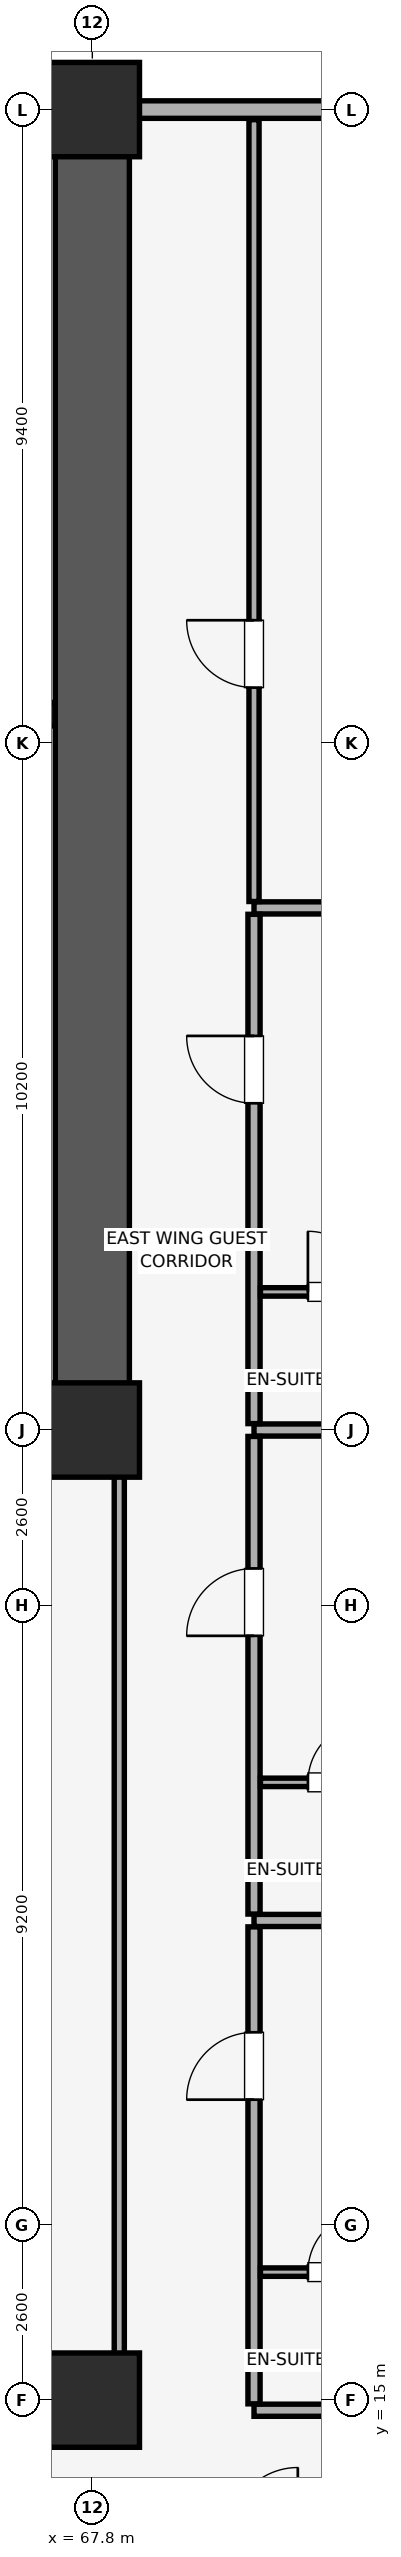
"""IFC4 building model, lengths in metres.
Left out: names, types, materials, properties, quantities, classifications, styles, units other than length and angle.
Written with IfcOpenShell. Run it as: python <this file> out.ifc"""

import sys

from ifc_helpers import new_model, si_unit, direction, frame, frame_2d, origin, origin_2d, place, context, subcontext, project, spatial, rectangle, extrude, element, fill, save


model = new_model("IFC4")
c1 = context("Model", 3, precision=1e-05, world=origin(), true_north=direction((0.0, 1.0)))
c2 = subcontext(c1, "Body", "Model", "MODEL_VIEW")
j1 = project(units=[si_unit("LENGTHUNIT", "METRE"), si_unit("PLANEANGLEUNIT", "RADIAN")], contexts=[c1])
p1 = place(None, origin())
s1 = spatial("IfcSite", under=j1, at=p1, CompositionType="ELEMENT")
p2 = place(p1, origin())
s2 = spatial("IfcBuilding", under=s1, at=p2, CompositionType="ELEMENT")
p3 = place(p2, frame((0.0, 0.0, 68.9)))
s3 = spatial("IfcBuildingStorey", under=s2, at=p3, CompositionType="ELEMENT", Elevation=68.9)
for number, where, z_axis, x_axis in (
    (1, (67.8, 15.0, 0.0), (0.0, 0.0, 1.0), (1.0, 0.0, 0.0)),
    (2, (67.8, 29.4, 0.0), (0.0, 0.0, 1.0), (1.0, 0.0, 0.0)),
    (3, (67.8, 49.0, 0.0), (0.0, 0.0, 1.0), (1.0, 0.0, 0.0)),
):
    element("IfcColumn", number, at=place(p3, frame(where, z_axis=z_axis, x_axis=x_axis)), inside=s3, PredefinedType="COLUMN", context=c2, shape_type="SweptSolid", body=[
        extrude(rectangle(XDim=1.4, YDim=1.4, at=origin_2d()), origin(), (0.0, 0.0, 1.0), 3.51),
    ])
p4 = place(p3, frame((79.8, 49.0, 0.0), z_axis=(0.0, 0.0, 1.0), x_axis=(-1.0, 0.0, 0.0)))
e4 = element("IfcWall", 4, at=p4, inside=s3, PredefinedType="SOLIDWALL", context=c2, shape_type="SweptSolid", body=[
    extrude(rectangle(XDim=75.6, YDim=0.26, at=frame_2d((37.8, 0.0))), origin(), (0.0, 0.0, 1.0), 2.56),
])
p5 = place(p4, frame((72.565, 0.0, 0.85)))
e5 = element("IfcOpeningElement", 5, at=p5, cuts=e4, PredefinedType="OPENING", context=c2, shape_type="SweptSolid", body=[
    extrude(rectangle(XDim=1.5, YDim=1.4, at=frame_2d((0.75, 0.7))), frame((0.0, 0.14, 0.0), z_axis=(0.0, -1.0, 0.0), x_axis=(1.0, 0.0, 0.0)), (0.0, 0.0, 1.0), 0.28),
])
p6 = place(p4, frame((67.45, 0.0, 0.85)))
e6 = element("IfcOpeningElement", 6, at=p6, cuts=e4, PredefinedType="OPENING", context=c2, shape_type="SweptSolid", body=[
    extrude(rectangle(XDim=1.5, YDim=1.4, at=frame_2d((0.75, 0.7))), frame((0.0, 0.14, 0.0), z_axis=(0.0, -1.0, 0.0), x_axis=(1.0, 0.0, 0.0)), (0.0, 0.0, 1.0), 0.28),
])
p7 = place(p4, frame((6.65, 0.0, 0.85)))
e7 = element("IfcOpeningElement", 7, at=p7, cuts=e4, PredefinedType="OPENING", context=c2, shape_type="SweptSolid", body=[
    extrude(rectangle(XDim=1.5, YDim=1.4, at=frame_2d((0.75, 0.7))), frame((0.0, 0.14, 0.0), z_axis=(0.0, -1.0, 0.0), x_axis=(1.0, 0.0, 0.0)), (0.0, 0.0, 1.0), 0.28),
])
p8 = place(p4, frame((1.535, 0.0, 0.85)))
e8 = element("IfcOpeningElement", 8, at=p8, cuts=e4, PredefinedType="OPENING", context=c2, shape_type="SweptSolid", body=[
    extrude(rectangle(XDim=1.5, YDim=1.4, at=frame_2d((0.75, 0.7))), frame((0.0, 0.14, 0.0), z_axis=(0.0, -1.0, 0.0), x_axis=(1.0, 0.0, 0.0)), (0.0, 0.0, 1.0), 0.28),
])
p9 = place(p4, frame((51.365, 0.0, 0.9)))
e9 = element("IfcOpeningElement", 9, at=p9, cuts=e4, PredefinedType="OPENING", context=c2, shape_type="SweptSolid", body=[
    extrude(rectangle(XDim=1.5, YDim=1.4, at=frame_2d((0.75, 0.7))), frame((0.0, 0.14, 0.0), z_axis=(0.0, -1.0, 0.0), x_axis=(1.0, 0.0, 0.0)), (0.0, 0.0, 1.0), 0.28),
])
p10 = place(p4, frame((46.0, 0.0, 0.9)))
e10 = element("IfcOpeningElement", 10, at=p10, cuts=e4, PredefinedType="OPENING", context=c2, shape_type="SweptSolid", body=[
    extrude(rectangle(XDim=1.5, YDim=1.4, at=frame_2d((0.75, 0.7))), frame((0.0, 0.14, 0.0), z_axis=(0.0, -1.0, 0.0), x_axis=(1.0, 0.0, 0.0)), (0.0, 0.0, 1.0), 0.28),
])
p11 = place(p4, frame((29.15, 0.0, 0.9)))
e11 = element("IfcOpeningElement", 11, at=p11, cuts=e4, PredefinedType="OPENING", context=c2, shape_type="SweptSolid", body=[
    extrude(rectangle(XDim=1.5, YDim=1.4, at=frame_2d((0.75, 0.7))), frame((0.0, 0.14, 0.0), z_axis=(0.0, -1.0, 0.0), x_axis=(1.0, 0.0, 0.0)), (0.0, 0.0, 1.0), 0.28),
])
p12 = place(p4, frame((23.485, 0.0, 0.9)))
e12 = element("IfcOpeningElement", 12, at=p12, cuts=e4, PredefinedType="OPENING", context=c2, shape_type="SweptSolid", body=[
    extrude(rectangle(XDim=1.5, YDim=1.4, at=frame_2d((0.75, 0.7))), frame((0.0, 0.14, 0.0), z_axis=(0.0, -1.0, 0.0), x_axis=(1.0, 0.0, 0.0)), (0.0, 0.0, 1.0), 0.28),
])
p13 = place(p3, frame((67.8, 29.4, 0.0), z_axis=(0.0, 0.0, 1.0), x_axis=(0.0, 1.0, 0.0)))
e13 = element("IfcWall", 13, at=p13, inside=s3, PredefinedType="SHEAR", context=c2, shape_type="SweptSolid", body=[
    extrude(rectangle(XDim=19.2, YDim=1.1, at=frame_2d((9.6, 0.0))), origin(), (0.0, 0.0, 1.0), 3.51),
])
p14 = place(p3, frame((60.4, 29.4, 0.0), z_axis=(0.0, 0.0, 1.0), x_axis=(1.0, 0.0, 0.0)))
e14 = element("IfcWall", 14, at=p14, inside=s3, PredefinedType="SHEAR", context=c2, shape_type="SweptSolid", body=[
    extrude(rectangle(XDim=6.845, YDim=1.1, at=frame_2d((3.423, 0.0))), origin(), (0.0, 0.0, 1.0), 3.51),
])
p15 = place(p3, frame((63.145, 40.025, 0.0), z_axis=(0.0, 0.0, 1.0), x_axis=(1.0, 0.0, 0.0)))
e15 = element("IfcWall", 15, at=p15, inside=s3, PredefinedType="SHEAR", context=c2, shape_type="SweptSolid", body=[
    extrude(rectangle(XDim=4.1, YDim=0.35, at=frame_2d((2.05, 0.0))), origin(), (0.0, 0.0, 1.0), 3.51),
])
p16 = place(p15, frame((1.24, 0.0, 0.0)))
e16 = element("IfcOpeningElement", 16, at=p16, cuts=e15, PredefinedType="OPENING", context=c2, shape_type="SweptSolid", body=[
    extrude(rectangle(XDim=1.15, YDim=2.15, at=frame_2d((0.575, 1.075))), frame((0.0, 0.185, 0.0), z_axis=(0.0, -1.0, 0.0), x_axis=(1.0, 0.0, 0.0)), (0.0, 0.0, 1.0), 0.37),
])
p17 = place(p3, frame((59.0, 14.85, 0.0), z_axis=(0.0, 0.0, 1.0), x_axis=(1.0, 0.0, 0.0)))
e17 = element("IfcWall", 17, at=p17, inside=s3, PredefinedType="PARTITIONING", context=c2, shape_type="SweptSolid", body=[
    extrude(rectangle(XDim=9.2, YDim=0.15, at=frame_2d((4.6, 0.0))), origin(), (0.0, 0.0, 1.0), 2.86),
])
p18 = place(p17, frame((4.1, 0.0, 0.0)))
e18 = element("IfcOpeningElement", 18, at=p18, cuts=e17, PredefinedType="OPENING", context=c2, shape_type="SweptSolid", body=[
    extrude(rectangle(XDim=1.0, YDim=2.15, at=frame_2d((0.5, 1.075))), frame((0.0, 0.085, 0.0), z_axis=(0.0, -1.0, 0.0), x_axis=(1.0, 0.0, 0.0)), (0.0, 0.0, 1.0), 0.17),
])
p19 = place(p3, frame((68.2, 14.93, 0.0), z_axis=(0.0, 0.0, 1.0), x_axis=(0.0, 1.0, 0.0)))
e19 = element("IfcWall", 19, at=p19, inside=s3, PredefinedType="PARTITIONING", context=c2, shape_type="SweptSolid", body=[
    extrude(rectangle(XDim=14.46, YDim=0.15, at=frame_2d((7.23, 0.0))), origin(), (0.0, 0.0, 1.0), 3.51),
])
p20 = place(p3, frame((70.2, 14.85, 0.0), z_axis=(0.0, 0.0, 1.0), x_axis=(1.0, 0.0, 0.0)))
e20 = element("IfcWall", 20, at=p20, inside=s3, PredefinedType="PARTITIONING", context=c2, shape_type="SweptSolid", body=[
    extrude(rectangle(XDim=13.65, YDim=0.18, at=frame_2d((6.825, 0.0))), origin(), (0.0, 0.0, 1.0), 2.86),
])
p21 = place(p3, frame((70.2, 22.12, 0.0), z_axis=(0.0, 0.0, 1.0), x_axis=(1.0, 0.0, 0.0)))
e21 = element("IfcWall", 21, at=p21, inside=s3, PredefinedType="PARTITIONING", context=c2, shape_type="SweptSolid", body=[
    extrude(rectangle(XDim=13.65, YDim=0.18, at=frame_2d((6.825, 0.0))), origin(), (0.0, 0.0, 1.0), 3.51),
])
p22 = place(p3, frame((70.2, 14.945, 0.0), z_axis=(0.0, 0.0, 1.0), x_axis=(0.0, 1.0, 0.0)))
e22 = element("IfcWall", 22, at=p22, inside=s3, PredefinedType="PARTITIONING", context=c2, shape_type="SweptSolid", body=[
    extrude(rectangle(XDim=7.08, YDim=0.18, at=frame_2d((3.54, 0.0))), origin(), (0.0, 0.0, 1.0), 3.51),
])
p23 = place(p22, frame((4.515, 0.0, 0.0)))
e23 = element("IfcOpeningElement", 23, at=p23, cuts=e22, PredefinedType="OPENING", context=c2, shape_type="SweptSolid", body=[
    extrude(rectangle(XDim=1.0, YDim=2.15, at=frame_2d((0.5, 1.075))), frame((0.0, 0.1, 0.0), z_axis=(0.0, -1.0, 0.0), x_axis=(1.0, 0.0, 0.0)), (0.0, 0.0, 1.0), 0.2),
])
p24 = place(p3, frame((70.295, 16.9, 0.0), z_axis=(0.0, 0.0, 1.0), x_axis=(1.0, 0.0, 0.0)))
e24 = element("IfcWall", 24, at=p24, inside=s3, PredefinedType="PARTITIONING", context=c2, shape_type="SweptSolid", body=[
    extrude(rectangle(XDim=2.405, YDim=0.125, at=frame_2d((1.203, 0.0))), origin(), (0.0, 0.0, 1.0), 3.51),
])
p25 = place(p24, frame((0.705, 0.0, 0.0)))
e25 = element("IfcOpeningElement", 25, at=p25, cuts=e24, PredefinedType="OPENING", context=c2, shape_type="SweptSolid", body=[
    extrude(rectangle(XDim=0.9, YDim=2.1, at=frame_2d((0.45, 1.05))), frame((0.0, 0.073, 0.0), z_axis=(0.0, -1.0, 0.0), x_axis=(1.0, 0.0, 0.0)), (0.0, 0.0, 1.0), 0.145),
])
p26 = place(p3, frame((70.2, 29.4, 0.0), z_axis=(0.0, 0.0, 1.0), x_axis=(1.0, 0.0, 0.0)))
e26 = element("IfcWall", 26, at=p26, inside=s3, PredefinedType="PARTITIONING", context=c2, shape_type="SweptSolid", body=[
    extrude(rectangle(XDim=13.65, YDim=0.18, at=frame_2d((6.825, 0.0))), origin(), (0.0, 0.0, 1.0), 2.86),
])
p27 = place(p3, frame((70.2, 22.215, 0.0), z_axis=(0.0, 0.0, 1.0), x_axis=(0.0, 1.0, 0.0)))
e27 = element("IfcWall", 27, at=p27, inside=s3, PredefinedType="PARTITIONING", context=c2, shape_type="SweptSolid", body=[
    extrude(rectangle(XDim=7.09, YDim=0.18, at=frame_2d((3.545, 0.0))), origin(), (0.0, 0.0, 1.0), 3.51),
])
p28 = place(p27, frame((4.13, 0.0, 0.0)))
e28 = element("IfcOpeningElement", 28, at=p28, cuts=e27, PredefinedType="OPENING", context=c2, shape_type="SweptSolid", body=[
    extrude(rectangle(XDim=1.0, YDim=2.15, at=frame_2d((0.5, 1.075))), frame((0.0, 0.1, 0.0), z_axis=(0.0, -1.0, 0.0), x_axis=(1.0, 0.0, 0.0)), (0.0, 0.0, 1.0), 0.2),
])
p29 = place(p3, frame((70.295, 24.17, 0.0), z_axis=(0.0, 0.0, 1.0), x_axis=(1.0, 0.0, 0.0)))
e29 = element("IfcWall", 29, at=p29, inside=s3, PredefinedType="PARTITIONING", context=c2, shape_type="SweptSolid", body=[
    extrude(rectangle(XDim=2.405, YDim=0.125, at=frame_2d((1.203, 0.0))), origin(), (0.0, 0.0, 1.0), 3.51),
])
p30 = place(p29, frame((0.705, 0.0, 0.0)))
e30 = element("IfcOpeningElement", 30, at=p30, cuts=e29, PredefinedType="OPENING", context=c2, shape_type="SweptSolid", body=[
    extrude(rectangle(XDim=0.9, YDim=2.1, at=frame_2d((0.45, 1.05))), frame((0.0, 0.073, 0.0), z_axis=(0.0, -1.0, 0.0), x_axis=(1.0, 0.0, 0.0)), (0.0, 0.0, 1.0), 0.145),
])
p31 = place(p3, frame((70.2, 37.15, 0.0), z_axis=(0.0, 0.0, 1.0), x_axis=(1.0, 0.0, 0.0)))
e31 = element("IfcWall", 31, at=p31, inside=s3, PredefinedType="PARTITIONING", context=c2, shape_type="SweptSolid", body=[
    extrude(rectangle(XDim=13.65, YDim=0.18, at=frame_2d((6.825, 0.0))), origin(), (0.0, 0.0, 1.0), 3.51),
])
p32 = place(p3, frame((70.2, 29.495, 0.0), z_axis=(0.0, 0.0, 1.0), x_axis=(0.0, 1.0, 0.0)))
e32 = element("IfcWall", 32, at=p32, inside=s3, PredefinedType="PARTITIONING", context=c2, shape_type="SweptSolid", body=[
    extrude(rectangle(XDim=7.56, YDim=0.18, at=frame_2d((3.78, 0.0))), origin(), (0.0, 0.0, 1.0), 3.51),
])
p33 = place(p32, frame((4.755, 0.0, 0.0)))
e33 = element("IfcOpeningElement", 33, at=p33, cuts=e32, PredefinedType="OPENING", context=c2, shape_type="SweptSolid", body=[
    extrude(rectangle(XDim=1.0, YDim=2.15, at=frame_2d((0.5, 1.075))), frame((0.0, 0.1, 0.0), z_axis=(0.0, -1.0, 0.0), x_axis=(1.0, 0.0, 0.0)), (0.0, 0.0, 1.0), 0.2),
])
p34 = place(p3, frame((70.295, 31.45, 0.0), z_axis=(0.0, 0.0, 1.0), x_axis=(1.0, 0.0, 0.0)))
e34 = element("IfcWall", 34, at=p34, inside=s3, PredefinedType="PARTITIONING", context=c2, shape_type="SweptSolid", body=[
    extrude(rectangle(XDim=2.405, YDim=0.125, at=frame_2d((1.203, 0.0))), origin(), (0.0, 0.0, 1.0), 3.51),
])
p35 = place(p34, frame((0.705, 0.0, 0.0)))
e35 = element("IfcOpeningElement", 35, at=p35, cuts=e34, PredefinedType="OPENING", context=c2, shape_type="SweptSolid", body=[
    extrude(rectangle(XDim=0.9, YDim=2.1, at=frame_2d((0.45, 1.05))), frame((0.0, 0.073, 0.0), z_axis=(0.0, -1.0, 0.0), x_axis=(1.0, 0.0, 0.0)), (0.0, 0.0, 1.0), 0.145),
])
p36 = place(p3, frame((70.2, 37.245, 0.0), z_axis=(0.0, 0.0, 1.0), x_axis=(0.0, 1.0, 0.0)))
e36 = element("IfcWall", 36, at=p36, inside=s3, PredefinedType="PARTITIONING", context=c2, shape_type="SweptSolid", body=[
    extrude(rectangle(XDim=11.605, YDim=0.15, at=frame_2d((5.802, 0.0))), origin(), (0.0, 0.0, 1.0), 3.51),
])
p37 = place(p36, frame((3.175, 0.0, 0.0)))
e37 = element("IfcOpeningElement", 37, at=p37, cuts=e36, PredefinedType="OPENING", context=c2, shape_type="SweptSolid", body=[
    extrude(rectangle(XDim=1.0, YDim=2.15, at=frame_2d((0.5, 1.075))), frame((0.0, 0.085, 0.0), z_axis=(0.0, -1.0, 0.0), x_axis=(1.0, 0.0, 0.0)), (0.0, 0.0, 1.0), 0.17),
])
p38 = place(p23, origin())
e38 = element("IfcDoor", 38, at=p38, inside=s3, OperationType="SINGLE_SWING_LEFT", PredefinedType="DOOR", context=c2, shape_type="SweptSolid", body=[
    extrude(rectangle(XDim=1.0, YDim=2.15, at=frame_2d((0.5, 1.075))), frame((0.0, 0.025, 0.0), z_axis=(0.0, -1.0, 0.0), x_axis=(1.0, 0.0, 0.0)), (0.0, 0.0, 1.0), 0.05),
])
fill(e23, e38)
p39 = place(p25, origin())
e39 = element("IfcDoor", 39, at=p39, inside=s3, OperationType="SINGLE_SWING_RIGHT", PredefinedType="DOOR", context=c2, shape_type="SweptSolid", body=[
    extrude(rectangle(XDim=0.9, YDim=2.1, at=frame_2d((0.45, 1.05))), frame((0.0, 0.025, 0.0), z_axis=(0.0, -1.0, 0.0), x_axis=(1.0, 0.0, 0.0)), (0.0, 0.0, 1.0), 0.05),
])
fill(e25, e39)
p40 = place(p28, origin())
e40 = element("IfcDoor", 40, at=p40, inside=s3, OperationType="SINGLE_SWING_LEFT", PredefinedType="DOOR", context=c2, shape_type="SweptSolid", body=[
    extrude(rectangle(XDim=1.0, YDim=2.15, at=frame_2d((0.5, 1.075))), frame((0.0, 0.025, 0.0), z_axis=(0.0, -1.0, 0.0), x_axis=(1.0, 0.0, 0.0)), (0.0, 0.0, 1.0), 0.05),
])
fill(e28, e40)
p41 = place(p30, origin())
e41 = element("IfcDoor", 41, at=p41, inside=s3, OperationType="SINGLE_SWING_RIGHT", PredefinedType="DOOR", context=c2, shape_type="SweptSolid", body=[
    extrude(rectangle(XDim=0.9, YDim=2.1, at=frame_2d((0.45, 1.05))), frame((0.0, 0.025, 0.0), z_axis=(0.0, -1.0, 0.0), x_axis=(1.0, 0.0, 0.0)), (0.0, 0.0, 1.0), 0.05),
])
fill(e30, e41)
p42 = place(p33, origin())
e42 = element("IfcDoor", 42, at=p42, inside=s3, OperationType="SINGLE_SWING_RIGHT", PredefinedType="DOOR", context=c2, shape_type="SweptSolid", body=[
    extrude(rectangle(XDim=1.0, YDim=2.15, at=frame_2d((0.5, 1.075))), frame((0.0, 0.025, 0.0), z_axis=(0.0, -1.0, 0.0), x_axis=(1.0, 0.0, 0.0)), (0.0, 0.0, 1.0), 0.05),
])
fill(e33, e42)
p43 = place(p35, origin())
e43 = element("IfcDoor", 43, at=p43, inside=s3, OperationType="SINGLE_SWING_LEFT", PredefinedType="DOOR", context=c2, shape_type="SweptSolid", body=[
    extrude(rectangle(XDim=0.9, YDim=2.1, at=frame_2d((0.45, 1.05))), frame((0.0, 0.025, 0.0), z_axis=(0.0, -1.0, 0.0), x_axis=(1.0, 0.0, 0.0)), (0.0, 0.0, 1.0), 0.05),
])
fill(e35, e43)
p44 = place(p37, origin())
e44 = element("IfcDoor", 44, at=p44, inside=s3, OperationType="SINGLE_SWING_RIGHT", PredefinedType="DOOR", context=c2, shape_type="SweptSolid", body=[
    extrude(rectangle(XDim=1.0, YDim=2.15, at=frame_2d((0.5, 1.075))), frame((0.0, 0.025, 0.0), z_axis=(0.0, -1.0, 0.0), x_axis=(1.0, 0.0, 0.0)), (0.0, 0.0, 1.0), 0.05),
])
fill(e37, e44)
save(model, sys.argv[1])
